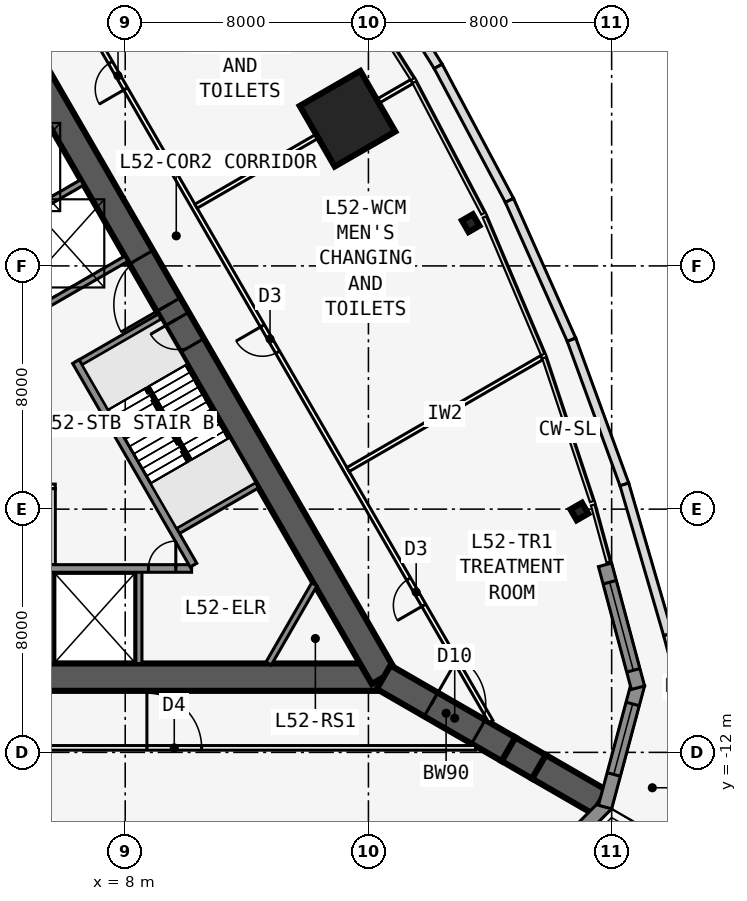
"""IFC4 building model, lengths in metres.
Left out: names, types, materials, properties, quantities, classifications, styles, units other than length and angle.
Written with IfcOpenShell. Run it as: python <this file> out.ifc"""

import sys

from ifc_helpers import new_model, si_unit, direction, frame, frame_2d, origin, origin_2d, place, context, subcontext, project, spatial, polyline, rectangle, i_section, outline, extrude, element, fill, save


model = new_model("IFC4")
c1 = context("Model", 3, precision=1e-05, world=origin(), true_north=direction((0.0, 1.0)))
c2 = subcontext(c1, "Body", "Model", "MODEL_VIEW")
j1 = project(units=[si_unit("LENGTHUNIT", "METRE"), si_unit("PLANEANGLEUNIT", "RADIAN")], contexts=[c1])
p1 = place(None, origin())
s1 = spatial("IfcSite", under=j1, at=p1, CompositionType="ELEMENT")
p2 = place(p1, origin())
s2 = spatial("IfcBuilding", under=s1, at=p2, CompositionType="ELEMENT")
p3 = place(p2, frame((0.0, 0.0, 195.9)))
s3 = spatial("IfcBuildingStorey", under=s2, at=p3, CompositionType="ELEMENT", Elevation=195.9)
p4 = place(p3, frame((-16.5, -9.526, 0.0), z_axis=(0.0, 0.0, 1.0), x_axis=(1.0, 0.0, 0.0)))
e1 = element("IfcWall", 1, at=p4, inside=s3, PredefinedType="SHEAR", context=c2, shape_type="SweptSolid", body=[
    extrude(rectangle(XDim=33.0, YDim=0.9, at=frame_2d((16.5, 0.0))), origin(), (0.0, 0.0, 1.0), 5.0),
])
p5 = place(p4, frame((14.05, 0.0, 0.0)))
e2 = element("IfcOpeningElement", 2, at=p5, cuts=e1, PredefinedType="OPENING", context=c2, shape_type="SweptSolid", body=[
    extrude(rectangle(XDim=1.8, YDim=2.13, at=frame_2d((0.9, 1.065))), frame((0.0, 0.46, 0.0), z_axis=(0.0, -1.0, 0.0), x_axis=(1.0, 0.0, 0.0)), (0.0, 0.0, 1.0), 0.92),
])
p6 = place(p3, frame((-0.55, -5.951, 0.0), z_axis=(0.0, 0.0, 1.0), x_axis=(1.0, 0.0, 0.0)))
e3 = element("IfcWall", 3, at=p6, inside=s3, PredefinedType="SOLIDWALL", context=c2, shape_type="SweptSolid", body=[
    extrude(rectangle(XDim=10.733, YDim=0.25, at=frame_2d((5.366, 0.0))), origin(), (0.0, 0.0, 1.0), 4.835),
])
p7 = place(p6, frame((9.314, 0.0, 0.0)))
e4 = element("IfcOpeningElement", 4, at=p7, cuts=e3, PredefinedType="OPENING", context=c2, shape_type="SweptSolid", body=[
    extrude(rectangle(XDim=0.9, YDim=2.13, at=frame_2d((0.45, 1.065))), frame((0.0, 0.135, 0.0), z_axis=(0.0, -1.0, 0.0), x_axis=(1.0, 0.0, 0.0)), (0.0, 0.0, 1.0), 0.27),
])
p8 = place(p6, frame((1.05, 0.0, 0.0)))
e5 = element("IfcOpeningElement", 5, at=p8, cuts=e3, PredefinedType="OPENING", context=c2, shape_type="SweptSolid", body=[
    extrude(rectangle(XDim=1.1, YDim=2.13, at=frame_2d((0.55, 1.065))), frame((0.0, 0.135, 0.0), z_axis=(0.0, -1.0, 0.0), x_axis=(1.0, 0.0, 0.0)), (0.0, 0.0, 1.0), 0.27),
])
p9 = place(p6, frame((4.05, 0.0, 0.0)))
e6 = element("IfcOpeningElement", 6, at=p9, cuts=e3, PredefinedType="OPENING", context=c2, shape_type="SweptSolid", body=[
    extrude(rectangle(XDim=1.1, YDim=2.13, at=frame_2d((0.55, 1.065))), frame((0.0, 0.135, 0.0), z_axis=(0.0, -1.0, 0.0), x_axis=(1.0, 0.0, 0.0)), (0.0, 0.0, 1.0), 0.27),
])
for number, where, z_axis, x_axis in (
    (7, (5.55, -5.951, 0.0), (0.0, 0.0, 1.0), (0.0, -1.0, 0.0)),
    (8, (8.45, -5.951, 0.0), (0.0, 0.0, 1.0), (0.0, -1.0, 0.0)),
):
    element("IfcWall", number, at=place(p3, frame(where, z_axis=z_axis, x_axis=x_axis)), inside=s3, PredefinedType="SOLIDWALL", context=c2, shape_type="SweptSolid", body=[
        extrude(rectangle(XDim=3.125, YDim=0.2, at=frame_2d((1.562, 0.0))), origin(), (0.0, 0.0, 1.0), 4.835),
    ])
p10 = place(p3, frame((16.5, -9.526, 0.0), z_axis=(0.0, 0.0, 1.0), x_axis=(-0.499999749417, 0.866025548458, 0.0)))
e9 = element("IfcWall", 9, at=p10, inside=s3, PredefinedType="SHEAR", context=c2, shape_type="SweptSolid", body=[
    extrude(rectangle(XDim=33.0, YDim=0.9, at=frame_2d((16.5, 0.0))), origin(), (0.0, 0.0, 1.0), 5.0),
])
p11 = place(p10, frame((14.15, 0.0, 0.0)))
e10 = element("IfcOpeningElement", 10, at=p11, cuts=e9, PredefinedType="OPENING", context=c2, shape_type="SweptSolid", body=[
    extrude(rectangle(XDim=1.8, YDim=2.13, at=frame_2d((0.9, 1.065))), frame((0.0, 0.46, 0.0), z_axis=(0.0, -1.0, 0.0), x_axis=(1.0, 0.0, 0.0)), (0.0, 0.0, 1.0), 0.92),
])
p12 = place(p10, frame((12.6, 0.0, 0.0)))
e11 = element("IfcOpeningElement", 11, at=p12, cuts=e9, PredefinedType="OPENING", context=c2, shape_type="SweptSolid", body=[
    extrude(rectangle(XDim=1.0, YDim=2.13, at=frame_2d((0.5, 1.065))), frame((0.0, 0.46, 0.0), z_axis=(0.0, -1.0, 0.0), x_axis=(1.0, 0.0, 0.0)), (0.0, 0.0, 1.0), 0.92),
])
p13 = place(p3, frame((10.245, -5.843, 0.0), z_axis=(0.0, 0.0, 1.0), x_axis=(-0.499993009313, 0.866029439822, 0.0)))
e12 = element("IfcWall", 12, at=p13, inside=s3, PredefinedType="SOLIDWALL", context=c2, shape_type="SweptSolid", body=[
    extrude(rectangle(XDim=7.733, YDim=0.25, at=frame_2d((3.866, 0.0))), origin(), (0.0, 0.0, 1.0), 4.835),
])
for number, where, z_axis, x_axis in (
    (13, (9.629, -4.775, 0.0), (0.0, 0.0, 1.0), (0.866, 0.5, 0.0)),
    (14, (6.429, 0.767, 0.0), (0.0, 0.0, 1.0), (0.866, 0.5, 0.0)),
    (15, (5.329, 2.673, 0.0), (0.0, 0.0, 1.0), (0.866, 0.5, 0.0)),
    (16, (3.879, 5.184, 0.0), (0.0, 0.0, 1.0), (0.866, 0.5, 0.0)),
):
    element("IfcWall", number, at=place(p3, frame(where, z_axis=z_axis, x_axis=x_axis)), inside=s3, PredefinedType="SOLIDWALL", context=c2, shape_type="SweptSolid", body=[
        extrude(rectangle(XDim=3.125, YDim=0.2, at=frame_2d((1.562, 0.0))), origin(), (0.0, 0.0, 1.0), 4.835),
    ])
p14 = place(p3, frame((16.5, -9.526, 0.0), z_axis=(0.0, 0.0, 1.0), x_axis=(0.866031398331, -0.499989616998, 0.0)))
e17 = element("IfcWall", 17, at=p14, inside=s3, PredefinedType="SHEAR", context=c2, shape_type="SweptSolid", body=[
    extrude(rectangle(XDim=4.746, YDim=0.9, at=frame_2d((2.373, 0.0))), origin(), (0.0, 0.0, 1.0), 5.0),
])
p15 = place(p14, frame((1.8, 0.0, 0.0)))
e18 = element("IfcOpeningElement", 18, at=p15, cuts=e17, PredefinedType="OPENING", context=c2, shape_type="SweptSolid", body=[
    extrude(rectangle(XDim=1.8, YDim=2.13, at=frame_2d((0.9, 1.065))), frame((0.0, 0.46, 0.0), z_axis=(0.0, -1.0, 0.0), x_axis=(1.0, 0.0, 0.0)), (0.0, 0.0, 1.0), 0.92),
])
p16 = place(p3, frame((20.61, -11.899, 0.0), z_axis=(0.0, 0.0, 1.0), x_axis=(0.866009537788, -0.500027479704, 0.0)))
e19 = element("IfcWall", 19, at=p16, inside=s3, PredefinedType="SHEAR", context=c2, shape_type="SweptSolid", body=[
    extrude(rectangle(XDim=1.155, YDim=0.9, at=frame_2d((0.577, 0.0))), origin(), (0.0, 0.0, 1.0), 5.0),
])
p17 = place(p3, frame((21.61, -12.477, 0.0), z_axis=(0.0, 0.0, 1.0), x_axis=(0.866055313784, -0.499948190782, 0.0)))
e20 = element("IfcWall", 20, at=p17, inside=s3, PredefinedType="SHEAR", context=c2, shape_type="SweptSolid", body=[
    extrude(rectangle(XDim=2.309, YDim=0.9, at=frame_2d((1.155, 0.0))), origin(), (0.0, 0.0, 1.0), 5.0),
])
for number, where, z_axis, x_axis in (
    (21, (22.937, -4.078, 0.0), (0.0, 0.0, 1.0), (-0.5, 0.866, 0.0)),
    (22, (19.363, 5.406, 0.0), (0.0, 0.0, 1.0), (0.866, 0.5, 0.0)),
):
    element("IfcColumn", number, at=place(p3, frame(where, z_axis=z_axis, x_axis=x_axis)), inside=s3, PredefinedType="COLUMN", context=c2, shape_type="SweptSolid", body=[
        extrude(i_section(OverallWidth=0.411, OverallDepth=0.434, WebThickness=0.036, FlangeThickness=0.057, at=origin_2d()), origin(), (0.0, 0.0, 1.0), 5.0),
    ])
p18 = place(p3, frame((15.312, 8.84, 0.0), z_axis=(0.0, 0.0, 1.0), x_axis=(0.866025403784, 0.5, 0.0)))
e23 = element("IfcColumn", 23, at=p18, inside=s3, PredefinedType="COLUMN", context=c2, shape_type="SweptSolid", body=[
    extrude(rectangle(XDim=2.3, YDim=2.3, at=origin_2d()), origin(), (0.0, 0.0, 1.0), 5.0),
])
p19 = place(p3, frame((20.882, -16.656, 0.0), z_axis=(0.0, 0.0, 1.0), x_axis=(0.707077605902, 0.707135955267, 0.0)))
e24 = element("IfcWall", 24, at=p19, inside=s3, PredefinedType="SOLIDWALL", context=c2, shape_type="SweptSolid", body=[
    extrude(outline(polyline([(4.184, 0.225), (4.125, 0.225), (3.633, 0.093), (3.598, 0.225), (0.0, 0.225), (0.0, -0.225), (4.184, -0.225), (4.184, 0.225)])), origin(), (0.0, 0.0, 1.0), 4.835),
])
p20 = place(p19, frame((0.674, 0.0, 0.6)))
e25 = element("IfcOpeningElement", 25, at=p20, cuts=e24, PredefinedType="OPENING", context=c2, shape_type="SweptSolid", body=[
    extrude(rectangle(XDim=2.4, YDim=3.2, at=frame_2d((1.2, 1.6))), frame((0.0, 0.235, 0.0), z_axis=(0.0, -1.0, 0.0), x_axis=(1.0, 0.0, 0.0)), (0.0, 0.0, 1.0), 0.47),
])
p21 = place(p3, frame((23.783, -13.798, 0.0), z_axis=(0.0, 0.0, 1.0), x_axis=(0.258799282522, 0.96593112144, 0.0)))
e26 = element("IfcWall", 26, at=p21, inside=s3, PredefinedType="SOLIDWALL", context=c2, shape_type="SweptSolid", body=[
    extrude(outline(polyline([(4.184, 0.225), (0.586, 0.225), (0.551, 0.093), (0.059, 0.225), (0.0, 0.225), (0.0, -0.225), (4.184, -0.225), (4.184, 0.225)])), origin(), (0.0, 0.0, 1.0), 4.835),
])
p22 = place(p21, frame((1.11, 0.0, 0.6)))
e27 = element("IfcOpeningElement", 27, at=p22, cuts=e26, PredefinedType="OPENING", context=c2, shape_type="SweptSolid", body=[
    extrude(rectangle(XDim=2.4, YDim=3.2, at=frame_2d((1.2, 1.6))), frame((0.0, 0.235, 0.0), z_axis=(0.0, -1.0, 0.0), x_axis=(1.0, 0.0, 0.0)), (0.0, 0.0, 1.0), 0.47),
])
p23 = place(p3, frame((24.865, -9.873, 0.0), z_axis=(0.0, 0.0, 1.0), x_axis=(-0.258784695888, 0.965935029479, 0.0)))
e28 = element("IfcWall", 28, at=p23, inside=s3, PredefinedType="SOLIDWALL", context=c2, shape_type="SweptSolid", body=[
    extrude(rectangle(XDim=4.184, YDim=0.45, at=frame_2d((2.092, 0.0))), origin(), (0.0, 0.0, 1.0), 4.835),
])
p24 = place(p23, frame((0.592, 0.0, 0.6)))
e29 = element("IfcOpeningElement", 29, at=p24, cuts=e28, PredefinedType="OPENING", context=c2, shape_type="SweptSolid", body=[
    extrude(rectangle(XDim=3.0, YDim=3.2, at=frame_2d((1.5, 1.6))), frame((0.0, 0.235, 0.0), z_axis=(0.0, -1.0, 0.0), x_axis=(1.0, 0.0, 0.0)), (0.0, 0.0, 1.0), 0.47),
])
p25 = place(p3, frame((15.649, 14.796, 0.0), z_axis=(0.0, 0.0, 1.0), x_axis=(0.529972566993, -0.848014786566, 0.0)))
e30 = element("IfcWall", 30, at=p25, inside=s3, PredefinedType="PARAPET", context=c2, shape_type="SweptSolid", body=[
    extrude(rectangle(XDim=4.993, YDim=0.3, at=frame_2d((2.496, 0.0))), origin(), (0.0, 0.0, 1.0), 1.1),
])
p26 = place(p3, frame((18.295, 10.562, 0.0), z_axis=(0.0, 0.0, 1.0), x_axis=(0.469412641147, -0.882978919528, 0.0)))
e31 = element("IfcWall", 31, at=p26, inside=s3, PredefinedType="PARAPET", context=c2, shape_type="SweptSolid", body=[
    extrude(rectangle(XDim=4.992, YDim=0.3, at=frame_2d((2.496, 0.0))), origin(), (0.0, 0.0, 1.0), 1.1),
])
p27 = place(p3, frame((20.638, 6.154, 0.0), z_axis=(0.0, 0.0, 1.0), x_axis=(0.406847176186, -0.913496237118, 0.0)))
e32 = element("IfcWall", 32, at=p27, inside=s3, PredefinedType="PARAPET", context=c2, shape_type="SweptSolid", body=[
    extrude(rectangle(XDim=5.017, YDim=0.3, at=frame_2d((2.509, 0.0))), origin(), (0.0, 0.0, 1.0), 1.1),
])
p28 = place(p3, frame((22.68, 1.571, 0.0), z_axis=(0.0, 0.0, 1.0), x_axis=(0.343193770581, -0.939264625031, 0.0)))
e33 = element("IfcWall", 33, at=p28, inside=s3, PredefinedType="PARAPET", context=c2, shape_type="SweptSolid", body=[
    extrude(rectangle(XDim=5.066, YDim=0.3, at=frame_2d((2.533, 0.0))), origin(), (0.0, 0.0, 1.0), 1.1),
])
p29 = place(p3, frame((24.418, -3.187, 0.0), z_axis=(0.0, 0.0, 1.0), x_axis=(0.279553216384, -0.960130199093, 0.0)))
e34 = element("IfcWall", 34, at=p29, inside=s3, PredefinedType="PARAPET", context=c2, shape_type="SweptSolid", body=[
    extrude(rectangle(XDim=5.141, YDim=0.3, at=frame_2d((2.571, 0.0))), origin(), (0.0, 0.0, 1.0), 1.1),
])
p30 = place(p3, frame((25.855, -8.123, 0.0), z_axis=(0.0, 0.0, 1.0), x_axis=(0.258837072303, -0.965920995735, 0.0)))
e35 = element("IfcWall", 35, at=p30, inside=s3, PredefinedType="PARAPET", context=c2, shape_type="SweptSolid", body=[
    extrude(rectangle(XDim=3.545, YDim=0.3, at=frame_2d((1.772, 0.0))), origin(), (0.0, 0.0, 1.0), 1.1),
])
p31 = place(p3, frame((26.773, -11.547, 0.0), z_axis=(0.0, 0.0, 1.0), x_axis=(-0.258837025974, -0.96592100815, 0.0)))
e36 = element("IfcWall", 36, at=p31, inside=s3, PredefinedType="PARAPET", context=c2, shape_type="SweptSolid", body=[
    extrude(rectangle(XDim=3.506, YDim=0.3, at=frame_2d((1.753, 0.0))), origin(), (0.0, 0.0, 1.0), 1.1),
])
p32 = place(p3, frame((-19.527, -11.851, 0.0), z_axis=(0.0, 0.0, 1.0), x_axis=(1.0, 0.0, 0.0)))
e37 = element("IfcWall", 37, at=p32, inside=s3, PredefinedType="PARTITIONING", context=c2, shape_type="SweptSolid", body=[
    extrude(rectangle(XDim=39.054, YDim=0.15, at=frame_2d((19.527, 0.0))), origin(), (0.0, 0.0, 1.0), 4.835),
])
p33 = place(p32, frame((9.013, 0.0, 0.0)))
e38 = element("IfcOpeningElement", 38, at=p33, cuts=e37, PredefinedType="OPENING", context=c2, shape_type="SweptSolid", body=[
    extrude(rectangle(XDim=1.8, YDim=2.13, at=frame_2d((0.9, 1.065))), frame((0.0, 0.085, 0.0), z_axis=(0.0, -1.0, 0.0), x_axis=(1.0, 0.0, 0.0)), (0.0, 0.0, 1.0), 0.17),
])
p34 = place(p32, frame((28.24, 0.0, 0.0)))
e39 = element("IfcOpeningElement", 39, at=p34, cuts=e37, PredefinedType="OPENING", context=c2, shape_type="SweptSolid", body=[
    extrude(rectangle(XDim=1.8, YDim=2.13, at=frame_2d((0.9, 1.065))), frame((0.0, 0.085, 0.0), z_axis=(0.0, -1.0, 0.0), x_axis=(1.0, 0.0, 0.0)), (0.0, 0.0, 1.0), 0.17),
])
p35 = place(p3, frame((20.027, -10.985, 0.0), z_axis=(0.0, 0.0, 1.0), x_axis=(-0.500001677587, 0.866024435227, 0.0)))
e40 = element("IfcWall", 40, at=p35, inside=s3, PredefinedType="PARTITIONING", context=c2, shape_type="SweptSolid", body=[
    extrude(rectangle(XDim=39.054, YDim=0.15, at=frame_2d((19.527, 0.0))), origin(), (0.0, 0.0, 1.0), 4.835),
])
p36 = place(p35, frame((4.414, 0.0, 0.0)))
e41 = element("IfcOpeningElement", 41, at=p36, cuts=e40, PredefinedType="OPENING", context=c2, shape_type="SweptSolid", body=[
    extrude(rectangle(XDim=1.0, YDim=2.13, at=frame_2d((0.5, 1.065))), frame((0.0, 0.085, 0.0), z_axis=(0.0, -1.0, 0.0), x_axis=(1.0, 0.0, 0.0)), (0.0, 0.0, 1.0), 0.17),
])
p37 = place(p35, frame((14.027, 0.0, 0.0)))
e42 = element("IfcOpeningElement", 42, at=p37, cuts=e40, PredefinedType="OPENING", context=c2, shape_type="SweptSolid", body=[
    extrude(rectangle(XDim=1.0, YDim=2.13, at=frame_2d((0.5, 1.065))), frame((0.0, 0.085, 0.0), z_axis=(0.0, -1.0, 0.0), x_axis=(1.0, 0.0, 0.0)), (0.0, 0.0, 1.0), 0.17),
])
p38 = place(p35, frame((24.027, 0.0, 0.0)))
e43 = element("IfcOpeningElement", 43, at=p38, cuts=e40, PredefinedType="OPENING", context=c2, shape_type="SweptSolid", body=[
    extrude(rectangle(XDim=1.0, YDim=2.13, at=frame_2d((0.5, 1.065))), frame((0.0, 0.085, 0.0), z_axis=(0.0, -1.0, 0.0), x_axis=(1.0, 0.0, 0.0)), (0.0, 0.0, 1.0), 0.17),
])
p39 = place(p35, frame((33.64, 0.0, 0.0)))
e44 = element("IfcOpeningElement", 44, at=p39, cuts=e40, PredefinedType="OPENING", context=c2, shape_type="SweptSolid", body=[
    extrude(rectangle(XDim=1.0, YDim=2.13, at=frame_2d((0.5, 1.065))), frame((0.0, 0.085, 0.0), z_axis=(0.0, -1.0, 0.0), x_axis=(1.0, 0.0, 0.0)), (0.0, 0.0, 1.0), 0.17),
])
p40 = place(p3, frame((15.329, -2.697, 0.0), z_axis=(0.0, 0.0, 1.0), x_axis=(0.866032463813, 0.499987771473, 0.0)))
e45 = element("IfcWall", 45, at=p40, inside=s3, PredefinedType="PARTITIONING", context=c2, shape_type="SweptSolid", body=[
    extrude(rectangle(XDim=7.355, YDim=0.15, at=frame_2d((3.677, 0.0))), origin(), (0.0, 0.0, 1.0), 3.989),
])
p41 = place(p3, frame((10.329, 5.963, 0.0), z_axis=(0.0, 0.0, 1.0), x_axis=(0.866026800146, 0.499997581422, 0.0)))
e46 = element("IfcWall", 46, at=p41, inside=s3, PredefinedType="PARTITIONING", context=c2, shape_type="SweptSolid", body=[
    extrude(rectangle(XDim=8.193, YDim=0.15, at=frame_2d((4.097, 0.0))), origin(), (0.0, 0.0, 1.0), 3.989),
])
p42 = place(p3, frame((-2.65, -3.251, 0.0), z_axis=(0.0, 0.0, 1.0), x_axis=(1.0, 0.0, 0.0)))
e47 = element("IfcWall", 47, at=p42, inside=s3, PredefinedType="PARTITIONING", context=c2, shape_type="SweptSolid", body=[
    extrude(rectangle(XDim=8.35, YDim=0.15, at=frame_2d((4.175, 0.0))), origin(), (0.0, 0.0, 1.0), 4.835),
])
p43 = place(p3, frame((5.625, -5.826, 0.0), z_axis=(0.0, 0.0, 1.0), x_axis=(0.0, 1.0, 0.0)))
e48 = element("IfcWall", 48, at=p43, inside=s3, PredefinedType="PARTITIONING", context=c2, shape_type="SweptSolid", body=[
    extrude(rectangle(XDim=2.5, YDim=0.15, at=frame_2d((1.25, 0.0))), origin(), (0.0, 0.0, 1.0), 4.835),
])
p44 = place(p3, frame((14.219, -6.476, 0.0), z_axis=(0.0, 0.0, 1.0), x_axis=(-0.499952404951, -0.866052881055, 0.0)))
e49 = element("IfcWall", 49, at=p44, inside=s3, PredefinedType="SOLIDWALL", context=c2, shape_type="SweptSolid", body=[
    extrude(rectangle(XDim=3.002, YDim=0.2, at=frame_2d((1.501, 0.0))), origin(), (0.0, 0.0, 1.0), 4.835),
])
p45 = place(p3, frame((10.135, -2.401, 0.0), z_axis=(0.0, 0.0, 1.0), x_axis=(-0.499992232847, 0.866029888106, 0.0)))
e50 = element("IfcWall", 50, at=p45, inside=s3, PredefinedType="SOLIDWALL", context=c2, shape_type="SweptSolid", body=[
    extrude(rectangle(XDim=2.794, YDim=0.1, at=frame_2d((1.397, 0.0))), origin(), (0.0, 0.0, 1.0), 5.0),
])
p46 = place(p22, origin())
e51 = element("IfcWindow", 51, at=p46, inside=s3, PartitioningType="SINGLE_PANEL", PredefinedType="WINDOW", context=c2, shape_type="SweptSolid", body=[
    extrude(rectangle(XDim=2.4, YDim=3.2, at=frame_2d((1.2, 1.6))), frame((0.0, 0.03, 0.0), z_axis=(0.0, -1.0, 0.0), x_axis=(1.0, 0.0, 0.0)), (0.0, 0.0, 1.0), 0.06),
])
fill(e27, e51)
p47 = place(p24, origin())
e52 = element("IfcWindow", 52, at=p47, inside=s3, PartitioningType="SINGLE_PANEL", PredefinedType="WINDOW", context=c2, shape_type="SweptSolid", body=[
    extrude(rectangle(XDim=3.0, YDim=3.2, at=frame_2d((1.5, 1.6))), frame((0.0, 0.03, 0.0), z_axis=(0.0, -1.0, 0.0), x_axis=(1.0, 0.0, 0.0)), (0.0, 0.0, 1.0), 0.06),
])
fill(e29, e52)
p48 = place(p34, origin())
e53 = element("IfcDoor", 53, at=p48, inside=s3, OperationType="DOUBLE_DOOR_SINGLE_SWING", PredefinedType="DOOR", context=c2, shape_type="SweptSolid", body=[
    extrude(rectangle(XDim=1.8, YDim=2.13, at=frame_2d((0.9, 1.065))), frame((0.0, 0.025, 0.0), z_axis=(0.0, -1.0, 0.0), x_axis=(1.0, 0.0, 0.0)), (0.0, 0.0, 1.0), 0.05),
])
fill(e39, e53)
p49 = place(p36, origin())
e54 = element("IfcDoor", 54, at=p49, inside=s3, OperationType="SINGLE_SWING_LEFT", PredefinedType="DOOR", context=c2, shape_type="SweptSolid", body=[
    extrude(rectangle(XDim=1.0, YDim=2.13, at=frame_2d((0.5, 1.065))), frame((0.0, 0.025, 0.0), z_axis=(0.0, -1.0, 0.0), x_axis=(1.0, 0.0, 0.0)), (0.0, 0.0, 1.0), 0.05),
])
fill(e41, e54)
p50 = place(p37, origin())
e55 = element("IfcDoor", 55, at=p50, inside=s3, OperationType="SINGLE_SWING_RIGHT", PredefinedType="DOOR", context=c2, shape_type="SweptSolid", body=[
    extrude(rectangle(XDim=1.0, YDim=2.13, at=frame_2d((0.5, 1.065))), frame((0.0, 0.025, 0.0), z_axis=(0.0, -1.0, 0.0), x_axis=(1.0, 0.0, 0.0)), (0.0, 0.0, 1.0), 0.05),
])
fill(e42, e55)
p51 = place(p38, origin())
e56 = element("IfcDoor", 56, at=p51, inside=s3, OperationType="SINGLE_SWING_LEFT", PredefinedType="DOOR", context=c2, shape_type="SweptSolid", body=[
    extrude(rectangle(XDim=1.0, YDim=2.13, at=frame_2d((0.5, 1.065))), frame((0.0, 0.025, 0.0), z_axis=(0.0, -1.0, 0.0), x_axis=(1.0, 0.0, 0.0)), (0.0, 0.0, 1.0), 0.05),
])
fill(e43, e56)
p52 = place(p11, origin())
e57 = element("IfcDoor", 57, at=p52, inside=s3, OperationType="DOUBLE_DOOR_SINGLE_SWING", PredefinedType="DOOR", context=c2, shape_type="SweptSolid", body=[
    extrude(rectangle(XDim=1.8, YDim=2.13, at=frame_2d((0.9, 1.065))), frame((0.0, 0.025, 0.0), z_axis=(0.0, -1.0, 0.0), x_axis=(1.0, 0.0, 0.0)), (0.0, 0.0, 1.0), 0.05),
])
fill(e10, e57)
p53 = place(p12, origin())
e58 = element("IfcDoor", 58, at=p53, inside=s3, OperationType="SINGLE_SWING_RIGHT", PredefinedType="DOOR", context=c2, shape_type="SweptSolid", body=[
    extrude(rectangle(XDim=1.0, YDim=2.13, at=frame_2d((0.5, 1.065))), frame((0.0, 0.025, 0.0), z_axis=(0.0, -1.0, 0.0), x_axis=(1.0, 0.0, 0.0)), (0.0, 0.0, 1.0), 0.05),
])
fill(e11, e58)
p54 = place(p15, origin())
e59 = element("IfcDoor", 59, at=p54, inside=s3, OperationType="DOUBLE_DOOR_DOUBLE_SWING", PredefinedType="DOOR", context=c2, shape_type="SweptSolid", body=[
    extrude(rectangle(XDim=1.8, YDim=2.13, at=frame_2d((0.9, 1.065))), frame((0.0, 0.025, 0.0), z_axis=(0.0, -1.0, 0.0), x_axis=(1.0, 0.0, 0.0)), (0.0, 0.0, 1.0), 0.05),
])
fill(e18, e59)
p55 = place(p7, origin())
e60 = element("IfcDoor", 60, at=p55, inside=s3, OperationType="SINGLE_SWING_RIGHT", PredefinedType="DOOR", context=c2, shape_type="SweptSolid", body=[
    extrude(rectangle(XDim=0.9, YDim=2.13, at=frame_2d((0.45, 1.065))), frame((0.0, 0.025, 0.0), z_axis=(0.0, -1.0, 0.0), x_axis=(1.0, 0.0, 0.0)), (0.0, 0.0, 1.0), 0.05),
])
fill(e4, e60)
save(model, sys.argv[1])
